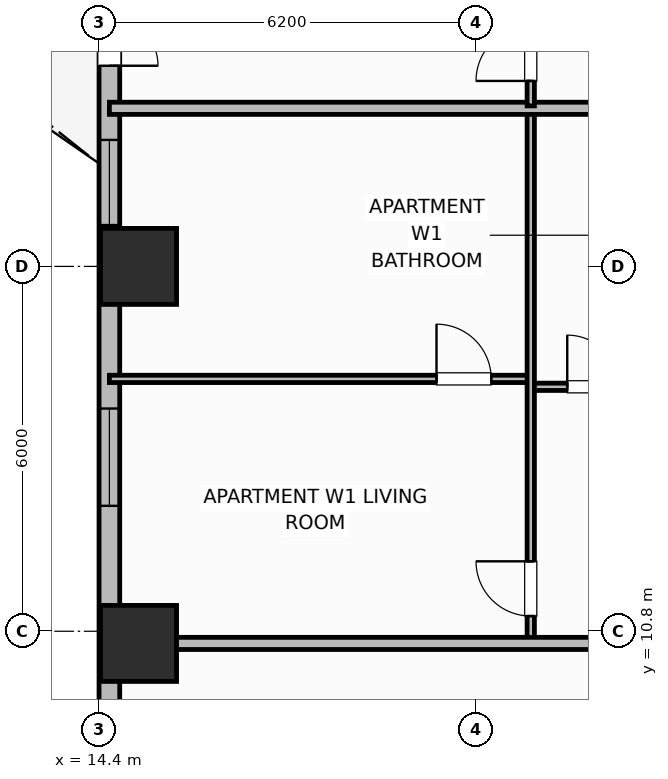
"""IFC4 building model, lengths in metres.
Left out: names, types, materials, properties, quantities, classifications, styles, units other than length and angle.
Written with IfcOpenShell. Run it as: python <this file> out.ifc"""

import sys

from ifc_helpers import new_model, si_unit, direction, frame, frame_2d, origin, origin_2d, place, context, subcontext, project, spatial, rectangle, extrude, element, fill, save


model = new_model("IFC4")
c1 = context("Model", 3, precision=1e-05, world=origin(), true_north=direction((0.0, 1.0)))
c2 = subcontext(c1, "Body", "Model", "MODEL_VIEW")
j1 = project(units=[si_unit("LENGTHUNIT", "METRE"), si_unit("PLANEANGLEUNIT", "RADIAN")], contexts=[c1])
p1 = place(None, origin())
s1 = spatial("IfcSite", under=j1, at=p1, CompositionType="ELEMENT")
p2 = place(p1, origin())
s2 = spatial("IfcBuilding", under=s1, at=p2, CompositionType="ELEMENT")
p3 = place(p2, frame((0.0, 0.0, 47.3)))
s3 = spatial("IfcBuildingStorey", under=s2, at=p3, CompositionType="ELEMENT", Elevation=47.3)
for number, where, z_axis, x_axis in (
    (1, (15.05, 10.6, 0.0), (0.0, 0.0, 1.0), (1.0, 0.0, 0.0)),
    (2, (15.05, 16.8, 0.0), (0.0, 0.0, 1.0), (1.0, 0.0, 0.0)),
):
    element("IfcColumn", number, at=place(p3, frame(where, z_axis=z_axis, x_axis=x_axis)), inside=s3, PredefinedType="COLUMN", context=c2, shape_type="SweptSolid", body=[
        extrude(rectangle(XDim=1.25, YDim=1.25, at=origin_2d()), origin(), (0.0, 0.0, 1.0), 3.7),
    ])
p4 = place(p3, frame((14.57, 23.8, 0.0), z_axis=(0.0, 0.0, 1.0), x_axis=(0.0, -1.0, 0.0)))
e3 = element("IfcWall", 3, at=p4, inside=s3, PredefinedType="SOLIDWALL", context=c2, shape_type="SweptSolid", body=[
    extrude(rectangle(XDim=14.8, YDim=0.34, at=frame_2d((7.4, 0.0))), origin(), (0.0, 0.0, 1.0), 2.7),
])
p5 = place(p4, frame((2.1, 0.0, 0.0)))
e4 = element("IfcOpeningElement", 4, at=p5, cuts=e3, PredefinedType="OPENING", context=c2, shape_type="SweptSolid", body=[
    extrude(rectangle(XDim=1.6, YDim=2.1, at=frame_2d((0.8, 1.05))), frame((0.0, 0.18, 0.0), z_axis=(0.0, -1.0, 0.0), x_axis=(1.0, 0.0, 0.0)), (0.0, 0.0, 1.0), 0.36),
])
p6 = place(p4, frame((4.92, 0.0, 0.69)))
e5 = element("IfcOpeningElement", 5, at=p6, cuts=e3, PredefinedType="OPENING", context=c2, shape_type="SweptSolid", body=[
    extrude(rectangle(XDim=1.4, YDim=1.85, at=frame_2d((0.7, 0.925))), frame((0.0, 0.18, 0.0), z_axis=(0.0, -1.0, 0.0), x_axis=(1.0, 0.0, 0.0)), (0.0, 0.0, 1.0), 0.36),
])
p7 = place(p4, frame((9.337, 0.0, 0.68)))
e6 = element("IfcOpeningElement", 6, at=p7, cuts=e3, PredefinedType="OPENING", context=c2, shape_type="SweptSolid", body=[
    extrude(rectangle(XDim=1.6, YDim=1.9, at=frame_2d((0.8, 0.95))), frame((0.0, 0.18, 0.0), z_axis=(0.0, -1.0, 0.0), x_axis=(1.0, 0.0, 0.0)), (0.0, 0.0, 1.0), 0.36),
])
p8 = place(p3, frame((21.5, 14.82, 0.0), z_axis=(0.0, 0.0, 1.0), x_axis=(1.0, 0.0, 0.0)))
e7 = element("IfcWall", 7, at=p8, inside=s3, PredefinedType="PARTITIONING", context=c2, shape_type="SweptSolid", body=[
    extrude(rectangle(XDim=2.25, YDim=0.12, at=frame_2d((1.125, 0.0))), origin(), (0.0, 0.0, 1.0), 2.53),
])
p9 = place(p8, frame((0.6, 0.0, 0.0)))
e8 = element("IfcOpeningElement", 8, at=p9, cuts=e7, PredefinedType="OPENING", context=c2, shape_type="SweptSolid", body=[
    extrude(rectangle(XDim=0.85, YDim=2.1, at=frame_2d((0.425, 1.05))), frame((0.0, 0.07, 0.0), z_axis=(0.0, -1.0, 0.0), x_axis=(1.0, 0.0, 0.0)), (0.0, 0.0, 1.0), 0.14),
])
p10 = place(p3, frame((14.57, 14.95, 0.0), z_axis=(0.0, 0.0, 1.0), x_axis=(1.0, 0.0, 0.0)))
e9 = element("IfcWall", 9, at=p10, inside=s3, PredefinedType="PARTITIONING", context=c2, shape_type="SweptSolid", body=[
    extrude(rectangle(XDim=6.93, YDim=0.12, at=frame_2d((3.465, 0.0))), origin(), (0.0, 0.0, 1.0), 2.53),
])
p11 = place(p10, frame((5.38, 0.0, 0.0)))
e10 = element("IfcOpeningElement", 10, at=p11, cuts=e9, PredefinedType="OPENING", context=c2, shape_type="SweptSolid", body=[
    extrude(rectangle(XDim=0.9, YDim=2.1, at=frame_2d((0.45, 1.05))), frame((0.0, 0.07, 0.0), z_axis=(0.0, -1.0, 0.0), x_axis=(1.0, 0.0, 0.0)), (0.0, 0.0, 1.0), 0.14),
])
p12 = place(p3, frame((21.5, 10.64, 0.0), z_axis=(0.0, 0.0, 1.0), x_axis=(0.0, 1.0, 0.0)))
e11 = element("IfcWall", 11, at=p12, inside=s3, PredefinedType="PARTITIONING", context=c2, shape_type="SweptSolid", body=[
    extrude(rectangle(XDim=8.72, YDim=0.12, at=frame_2d((4.36, 0.0))), origin(), (0.0, 0.0, 1.0), 2.53),
])
p13 = place(p12, frame((0.41, 0.0, 0.0)))
e12 = element("IfcOpeningElement", 12, at=p13, cuts=e11, PredefinedType="OPENING", context=c2, shape_type="SweptSolid", body=[
    extrude(rectangle(XDim=0.9, YDim=2.1, at=frame_2d((0.45, 1.05))), frame((0.0, 0.07, 0.0), z_axis=(0.0, -1.0, 0.0), x_axis=(1.0, 0.0, 0.0)), (0.0, 0.0, 1.0), 0.14),
])
p14 = place(p3, frame((14.57, 19.4, 0.0), z_axis=(0.0, 0.0, 1.0), x_axis=(1.0, 0.0, 0.0)))
e13 = element("IfcWall", 13, at=p14, inside=s3, PredefinedType="PARTITIONING", context=c2, shape_type="SweptSolid", body=[
    extrude(rectangle(XDim=9.18, YDim=0.2, at=frame_2d((4.59, 0.0))), origin(), (0.0, 0.0, 1.0), 2.53),
])
p15 = place(p3, frame((21.5, 19.44, 0.0), z_axis=(0.0, 0.0, 1.0), x_axis=(0.0, 1.0, 0.0)))
e14 = element("IfcWall", 14, at=p15, inside=s3, PredefinedType="PARTITIONING", context=c2, shape_type="SweptSolid", body=[
    extrude(rectangle(XDim=7.12, YDim=0.12, at=frame_2d((3.56, 0.0))), origin(), (0.0, 0.0, 1.0), 2.53),
])
p16 = place(p15, frame((0.41, 0.0, 0.0)))
e15 = element("IfcOpeningElement", 15, at=p16, cuts=e14, PredefinedType="OPENING", context=c2, shape_type="SweptSolid", body=[
    extrude(rectangle(XDim=0.9, YDim=2.1, at=frame_2d((0.45, 1.05))), frame((0.0, 0.07, 0.0), z_axis=(0.0, -1.0, 0.0), x_axis=(1.0, 0.0, 0.0)), (0.0, 0.0, 1.0), 0.14),
])
p17 = place(p3, frame((14.99, 10.6, 0.0), z_axis=(0.0, 0.0, 1.0), x_axis=(1.0, 0.0, 0.0)))
e16 = element("IfcWall", 16, at=p17, inside=s3, PredefinedType="PARTITIONING", context=c2, shape_type="SweptSolid", body=[
    extrude(rectangle(XDim=8.76, YDim=0.2, at=frame_2d((4.38, 0.0))), origin(), (0.0, 0.0, 1.0), 2.53),
])
p18 = place(p5, origin())
e17 = element("IfcDoor", 17, at=p18, inside=s3, OperationType="DOUBLE_DOOR_SINGLE_SWING", PredefinedType="DOOR", context=c2, shape_type="SweptSolid", body=[
    extrude(rectangle(XDim=1.6, YDim=2.1, at=frame_2d((0.8, 1.05))), frame((0.0, 0.025, 0.0), z_axis=(0.0, -1.0, 0.0), x_axis=(1.0, 0.0, 0.0)), (0.0, 0.0, 1.0), 0.05),
])
fill(e4, e17)
p19 = place(p6, origin())
e18 = element("IfcWindow", 18, at=p19, inside=s3, PartitioningType="SINGLE_PANEL", PredefinedType="WINDOW", context=c2, shape_type="SweptSolid", body=[
    extrude(rectangle(XDim=1.4, YDim=1.85, at=frame_2d((0.7, 0.925))), frame((0.0, 0.03, 0.0), z_axis=(0.0, -1.0, 0.0), x_axis=(1.0, 0.0, 0.0)), (0.0, 0.0, 1.0), 0.06),
])
fill(e5, e18)
p20 = place(p7, origin())
e19 = element("IfcWindow", 19, at=p20, inside=s3, PartitioningType="SINGLE_PANEL", PredefinedType="WINDOW", context=c2, shape_type="SweptSolid", body=[
    extrude(rectangle(XDim=1.6, YDim=1.9, at=frame_2d((0.8, 0.95))), frame((0.0, 0.03, 0.0), z_axis=(0.0, -1.0, 0.0), x_axis=(1.0, 0.0, 0.0)), (0.0, 0.0, 1.0), 0.06),
])
fill(e6, e19)
p21 = place(p9, origin())
e20 = element("IfcDoor", 20, at=p21, inside=s3, OperationType="SINGLE_SWING_LEFT", PredefinedType="DOOR", context=c2, shape_type="SweptSolid", body=[
    extrude(rectangle(XDim=0.85, YDim=2.1, at=frame_2d((0.425, 1.05))), frame((0.0, 0.025, 0.0), z_axis=(0.0, -1.0, 0.0), x_axis=(1.0, 0.0, 0.0)), (0.0, 0.0, 1.0), 0.05),
])
fill(e8, e20)
p22 = place(p11, origin())
e21 = element("IfcDoor", 21, at=p22, inside=s3, OperationType="SINGLE_SWING_LEFT", PredefinedType="DOOR", context=c2, shape_type="SweptSolid", body=[
    extrude(rectangle(XDim=0.9, YDim=2.1, at=frame_2d((0.45, 1.05))), frame((0.0, 0.025, 0.0), z_axis=(0.0, -1.0, 0.0), x_axis=(1.0, 0.0, 0.0)), (0.0, 0.0, 1.0), 0.05),
])
fill(e10, e21)
p23 = place(p13, origin())
e22 = element("IfcDoor", 22, at=p23, inside=s3, OperationType="SINGLE_SWING_RIGHT", PredefinedType="DOOR", context=c2, shape_type="SweptSolid", body=[
    extrude(rectangle(XDim=0.9, YDim=2.1, at=frame_2d((0.45, 1.05))), frame((0.0, 0.025, 0.0), z_axis=(0.0, -1.0, 0.0), x_axis=(1.0, 0.0, 0.0)), (0.0, 0.0, 1.0), 0.05),
])
fill(e12, e22)
p24 = place(p16, origin())
e23 = element("IfcDoor", 23, at=p24, inside=s3, OperationType="SINGLE_SWING_LEFT", PredefinedType="DOOR", context=c2, shape_type="SweptSolid", body=[
    extrude(rectangle(XDim=0.9, YDim=2.1, at=frame_2d((0.45, 1.05))), frame((0.0, 0.025, 0.0), z_axis=(0.0, -1.0, 0.0), x_axis=(1.0, 0.0, 0.0)), (0.0, 0.0, 1.0), 0.05),
])
fill(e15, e23)
save(model, sys.argv[1])
